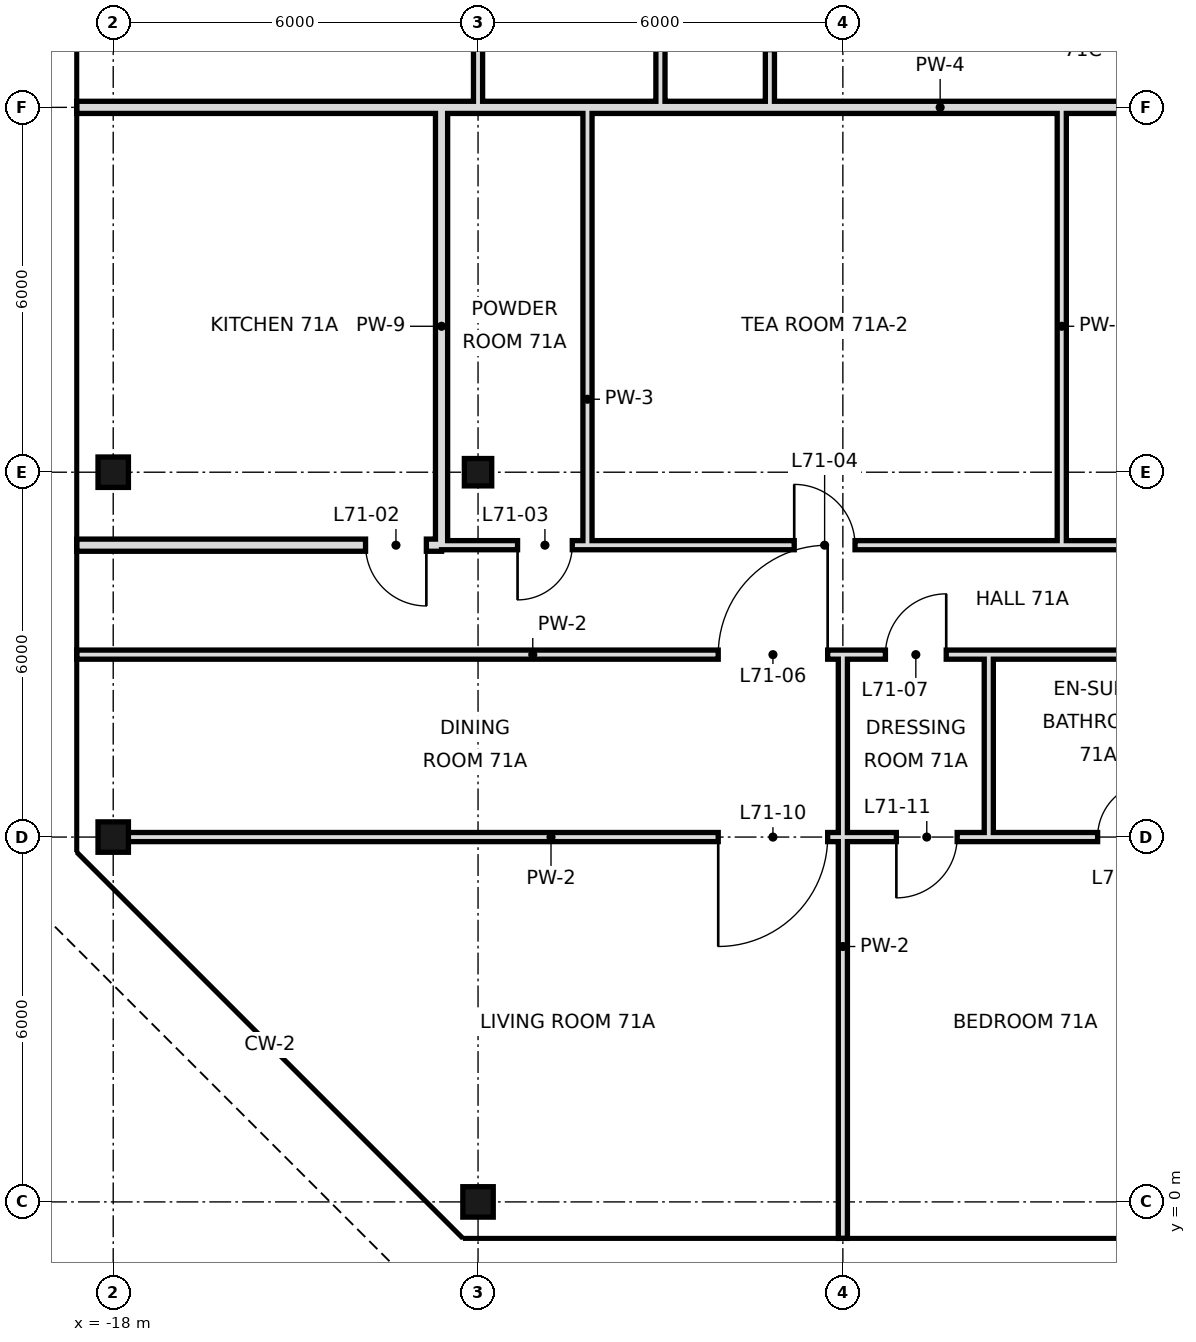
"""IFC4 building model, lengths in metres.
Left out: names, types, materials, properties, quantities, classifications, styles, units other than length and angle.
Written with IfcOpenShell. Run it as: python <this file> out.ifc"""

import sys

from ifc_helpers import new_model, si_unit, direction, frame, frame_2d, origin, origin_2d, place, context, subcontext, project, spatial, rectangle, hollow_rectangle, extrude, element, fill, save


model = new_model("IFC4")
c1 = context("Model", 3, precision=1e-05, world=origin(), true_north=direction((0.0, 1.0)))
c2 = subcontext(c1, "Body", "Model", "MODEL_VIEW")
j1 = project(units=[si_unit("LENGTHUNIT", "METRE"), si_unit("PLANEANGLEUNIT", "RADIAN")], contexts=[c1])
p1 = place(None, origin())
s1 = spatial("IfcSite", under=j1, at=p1, CompositionType="ELEMENT")
p2 = place(p1, origin())
s2 = spatial("IfcBuilding", under=s1, at=p2, CompositionType="ELEMENT")
p3 = place(p2, frame((0.0, 0.0, 301.6)))
s3 = spatial("IfcBuildingStorey", under=s2, at=p3, CompositionType="ELEMENT", Elevation=301.6)
for number, where, z_axis, x_axis in (
    (1, (-18.0, 6.0, 0.0), (0.0, 0.0, 1.0), (1.0, 0.0, 0.0)),
    (2, (-18.0, 12.0, 0.0), (0.0, 0.0, 1.0), (1.0, 0.0, 0.0)),
    (3, (-12.0, 0.0, 0.0), (0.0, 0.0, 1.0), (1.0, 0.0, 0.0)),
):
    element("IfcColumn", number, at=place(p3, frame(where, z_axis=z_axis, x_axis=x_axis)), inside=s3, PredefinedType="COLUMN", context=c2, shape_type="SweptSolid", body=[
        extrude(hollow_rectangle(XDim=0.5, YDim=0.5, WallThickness=0.025, at=origin_2d()), origin(), (0.0, 0.0, 1.0), 3.6),
    ])
p4 = place(p3, frame((-12.0, 12.0, 0.0), z_axis=(0.0, 0.0, 1.0), x_axis=(1.0, 0.0, 0.0)))
e4 = element("IfcColumn", 4, at=p4, inside=s3, PredefinedType="COLUMN", context=c2, shape_type="SweptSolid", body=[
    extrude(hollow_rectangle(XDim=0.45, YDim=0.45, WallThickness=0.022, at=origin_2d()), origin(), (0.0, 0.0, 1.0), 3.6),
])
p5 = place(p3, frame((-10.2, 10.8, 0.0), z_axis=(0.0, 0.0, 1.0), x_axis=(0.0, 1.0, 0.0)))
e5 = element("IfcWall", 5, at=p5, inside=s3, PredefinedType="PARTITIONING", context=c2, shape_type="SweptSolid", body=[
    extrude(rectangle(XDim=7.2, YDim=0.15, at=frame_2d((3.6, 0.0))), origin(), (0.0, 0.0, 1.0), 3.42),
])
p6 = place(p3, frame((-12.0, 18.0, 0.0), z_axis=(0.0, 0.0, 1.0), x_axis=(0.0, 1.0, 0.0)))
e6 = element("IfcWall", 6, at=p6, inside=s3, PredefinedType="PARTITIONING", context=c2, shape_type="SweptSolid", body=[
    extrude(rectangle(XDim=12.0, YDim=0.15, at=frame_2d((6.0, 0.0))), origin(), (0.0, 0.0, 1.0), 2.72),
])
p7 = place(p6, frame((3.16, 0.0, 0.0)))
e7 = element("IfcOpeningElement", 7, at=p7, cuts=e6, PredefinedType="OPENING", context=c2, shape_type="SweptSolid", body=[
    extrude(rectangle(XDim=1.8, YDim=2.4, at=frame_2d((0.9, 1.2))), frame((0.0, 0.085, 0.0), z_axis=(0.0, -1.0, 0.0), x_axis=(1.0, 0.0, 0.0)), (0.0, 0.0, 1.0), 0.17),
])
p8 = place(p3, frame((-12.6, 10.8, 0.0), z_axis=(0.0, 0.0, 1.0), x_axis=(0.0, 1.0, 0.0)))
e8 = element("IfcWall", 8, at=p8, inside=s3, PredefinedType="SOLIDWALL", context=c2, shape_type="SweptSolid", body=[
    extrude(rectangle(XDim=7.2, YDim=0.2, at=frame_2d((3.6, 0.0))), origin(), (0.0, 0.0, 1.0), 2.97),
])
p9 = place(p3, frame((-2.4, 10.8, 0.0), z_axis=(0.0, 0.0, 1.0), x_axis=(0.0, 1.0, 0.0)))
e9 = element("IfcWall", 9, at=p9, inside=s3, PredefinedType="PARTITIONING", context=c2, shape_type="SweptSolid", body=[
    extrude(rectangle(XDim=7.2, YDim=0.15, at=frame_2d((3.6, 0.0))), origin(), (0.0, 0.0, 1.0), 3.42),
])
p10 = place(p3, frame((-3.6, 6.0, 0.0), z_axis=(0.0, 0.0, 1.0), x_axis=(0.0, 1.0, 0.0)))
e10 = element("IfcWall", 10, at=p10, inside=s3, PredefinedType="PARTITIONING", context=c2, shape_type="SweptSolid", body=[
    extrude(rectangle(XDim=3.0, YDim=0.15, at=frame_2d((1.5, 0.0))), origin(), (0.0, 0.0, 1.0), 3.42),
])
p11 = place(p3, frame((-6.0, -0.6, 0.0), z_axis=(0.0, 0.0, 1.0), x_axis=(0.0, 1.0, 0.0)))
e11 = element("IfcWall", 11, at=p11, inside=s3, PredefinedType="PARTITIONING", context=c2, shape_type="SweptSolid", body=[
    extrude(rectangle(XDim=9.6, YDim=0.15, at=frame_2d((4.8, 0.0))), origin(), (0.0, 0.0, 1.0), 3.42),
])
p12 = place(p3, frame((-7.2, 18.0, 0.0), z_axis=(0.0, 0.0, 1.0), x_axis=(0.0, 1.0, 0.0)))
e12 = element("IfcWall", 12, at=p12, inside=s3, PredefinedType="PARTITIONING", context=c2, shape_type="SweptSolid", body=[
    extrude(rectangle(XDim=2.4, YDim=0.15, at=frame_2d((1.2, 0.0))), origin(), (0.0, 0.0, 1.0), 3.42),
])
p13 = place(p12, frame((0.95, 0.0, 0.0)))
e13 = element("IfcOpeningElement", 13, at=p13, cuts=e12, PredefinedType="OPENING", context=c2, shape_type="SweptSolid", body=[
    extrude(rectangle(XDim=0.9, YDim=2.4, at=frame_2d((0.45, 1.2))), frame((0.0, 0.085, 0.0), z_axis=(0.0, -1.0, 0.0), x_axis=(1.0, 0.0, 0.0)), (0.0, 0.0, 1.0), 0.17),
])
p14 = place(p3, frame((-9.0, 18.0, 0.0), z_axis=(0.0, 0.0, 1.0), x_axis=(0.0, 1.0, 0.0)))
e14 = element("IfcWall", 14, at=p14, inside=s3, PredefinedType="PARTITIONING", context=c2, shape_type="SweptSolid", body=[
    extrude(rectangle(XDim=18.0, YDim=0.15, at=frame_2d((9.0, 0.0))), origin(), (0.0, 0.0, 1.0), 3.42),
])
p15 = place(p14, frame((3.16, 0.0, 0.0)))
e15 = element("IfcOpeningElement", 15, at=p15, cuts=e14, PredefinedType="OPENING", context=c2, shape_type="SweptSolid", body=[
    extrude(rectangle(XDim=1.8, YDim=2.4, at=frame_2d((0.9, 1.2))), frame((0.0, 0.085, 0.0), z_axis=(0.0, -1.0, 0.0), x_axis=(1.0, 0.0, 0.0)), (0.0, 0.0, 1.0), 0.17),
])
p16 = place(p14, frame((13.6, 0.0, 0.0)))
e16 = element("IfcOpeningElement", 16, at=p16, cuts=e14, PredefinedType="OPENING", context=c2, shape_type="SweptSolid", body=[
    extrude(rectangle(XDim=1.0, YDim=2.4, at=frame_2d((0.5, 1.2))), frame((0.0, 0.085, 0.0), z_axis=(0.0, -1.0, 0.0), x_axis=(1.0, 0.0, 0.0)), (0.0, 0.0, 1.0), 0.17),
])
p17 = place(p3, frame((-18.6, 10.8, 0.0), z_axis=(0.0, 0.0, 1.0), x_axis=(1.0, 0.0, 0.0)))
e17 = element("IfcWall", 17, at=p17, inside=s3, PredefinedType="SOLIDWALL", context=c2, shape_type="SweptSolid", body=[
    extrude(rectangle(XDim=6.0, YDim=0.2, at=frame_2d((3.0, 0.0))), origin(), (0.0, 0.0, 1.0), 2.97),
])
p18 = place(p17, frame((4.75, 0.0, 0.0)))
e18 = element("IfcOpeningElement", 18, at=p18, cuts=e17, PredefinedType="OPENING", context=c2, shape_type="SweptSolid", body=[
    extrude(rectangle(XDim=1.0, YDim=2.4, at=frame_2d((0.5, 1.2))), frame((0.0, 0.11, 0.0), z_axis=(0.0, -1.0, 0.0), x_axis=(1.0, 0.0, 0.0)), (0.0, 0.0, 1.0), 0.22),
])
p19 = place(p3, frame((-10.2, 10.8, 0.0), z_axis=(0.0, 0.0, 1.0), x_axis=(1.0, 0.0, 0.0)))
e19 = element("IfcWall", 19, at=p19, inside=s3, PredefinedType="PARTITIONING", context=c2, shape_type="SweptSolid", body=[
    extrude(rectangle(XDim=22.2, YDim=0.15, at=frame_2d((11.1, 0.0))), origin(), (0.0, 0.0, 1.0), 3.42),
])
p20 = place(p19, frame((20.32, 0.0, 0.0)))
e20 = element("IfcOpeningElement", 20, at=p20, cuts=e19, PredefinedType="OPENING", context=c2, shape_type="SweptSolid", body=[
    extrude(rectangle(XDim=1.0, YDim=2.4, at=frame_2d((0.5, 1.2))), frame((0.0, 0.085, 0.0), z_axis=(0.0, -1.0, 0.0), x_axis=(1.0, 0.0, 0.0)), (0.0, 0.0, 1.0), 0.17),
])
p21 = place(p19, frame((3.4, 0.0, 0.0)))
e21 = element("IfcOpeningElement", 21, at=p21, cuts=e19, PredefinedType="OPENING", context=c2, shape_type="SweptSolid", body=[
    extrude(rectangle(XDim=1.0, YDim=2.4, at=frame_2d((0.5, 1.2))), frame((0.0, 0.085, 0.0), z_axis=(0.0, -1.0, 0.0), x_axis=(1.0, 0.0, 0.0)), (0.0, 0.0, 1.0), 0.17),
])
p22 = place(p19, frame((10.84, 0.0, 0.0)))
e22 = element("IfcOpeningElement", 22, at=p22, cuts=e19, PredefinedType="OPENING", context=c2, shape_type="SweptSolid", body=[
    extrude(rectangle(XDim=1.0, YDim=2.4, at=frame_2d((0.5, 1.2))), frame((0.0, 0.085, 0.0), z_axis=(0.0, -1.0, 0.0), x_axis=(1.0, 0.0, 0.0)), (0.0, 0.0, 1.0), 0.17),
])
p23 = place(p3, frame((-12.6, 10.8, 0.0), z_axis=(0.0, 0.0, 1.0), x_axis=(1.0, 0.0, 0.0)))
e23 = element("IfcWall", 23, at=p23, inside=s3, PredefinedType="PARTITIONING", context=c2, shape_type="SweptSolid", body=[
    extrude(rectangle(XDim=2.4, YDim=0.15, at=frame_2d((1.2, 0.0))), origin(), (0.0, 0.0, 1.0), 3.42),
])
p24 = place(p23, frame((1.25, 0.0, 0.0)))
e24 = element("IfcOpeningElement", 24, at=p24, cuts=e23, PredefinedType="OPENING", context=c2, shape_type="SweptSolid", body=[
    extrude(rectangle(XDim=0.9, YDim=2.4, at=frame_2d((0.45, 1.2))), frame((0.0, 0.085, 0.0), z_axis=(0.0, -1.0, 0.0), x_axis=(1.0, 0.0, 0.0)), (0.0, 0.0, 1.0), 0.17),
])
p25 = place(p3, frame((-18.6, 18.0, 0.0), z_axis=(0.0, 0.0, 1.0), x_axis=(1.0, 0.0, 0.0)))
e25 = element("IfcWall", 25, at=p25, inside=s3, PredefinedType="SOLIDWALL", context=c2, shape_type="SweptSolid", body=[
    extrude(rectangle(XDim=6.0, YDim=0.2, at=frame_2d((3.0, 0.0))), origin(), (0.0, 0.0, 1.0), 2.72),
])
p26 = place(p3, frame((-12.6, 18.0, 0.0), z_axis=(0.0, 0.0, 1.0), x_axis=(1.0, 0.0, 0.0)))
e26 = element("IfcWall", 26, at=p26, inside=s3, PredefinedType="SOLIDWALL", context=c2, shape_type="SweptSolid", body=[
    extrude(rectangle(XDim=15.7, YDim=0.2, at=frame_2d((7.85, 0.0))), origin(), (0.0, 0.0, 1.0), 2.72),
])
p27 = place(p3, frame((-18.0, 6.0, 0.0), z_axis=(0.0, 0.0, 1.0), x_axis=(1.0, 0.0, 0.0)))
e27 = element("IfcWall", 27, at=p27, inside=s3, PredefinedType="PARTITIONING", context=c2, shape_type="SweptSolid", body=[
    extrude(rectangle(XDim=14.4, YDim=0.15, at=frame_2d((7.2, 0.0))), origin(), (0.0, 0.0, 1.0), 2.72),
])
p28 = place(p27, frame((9.95, 0.0, 0.0)))
e28 = element("IfcOpeningElement", 28, at=p28, cuts=e27, PredefinedType="OPENING", context=c2, shape_type="SweptSolid", body=[
    extrude(rectangle(XDim=1.8, YDim=2.4, at=frame_2d((0.9, 1.2))), frame((0.0, 0.085, 0.0), z_axis=(0.0, -1.0, 0.0), x_axis=(1.0, 0.0, 0.0)), (0.0, 0.0, 1.0), 0.17),
])
p29 = place(p27, frame((12.88, 0.0, 0.0)))
e29 = element("IfcOpeningElement", 29, at=p29, cuts=e27, PredefinedType="OPENING", context=c2, shape_type="SweptSolid", body=[
    extrude(rectangle(XDim=1.0, YDim=2.4, at=frame_2d((0.5, 1.2))), frame((0.0, 0.085, 0.0), z_axis=(0.0, -1.0, 0.0), x_axis=(1.0, 0.0, 0.0)), (0.0, 0.0, 1.0), 0.17),
])
p30 = place(p3, frame((-3.6, 6.0, 0.0), z_axis=(0.0, 0.0, 1.0), x_axis=(1.0, 0.0, 0.0)))
e30 = element("IfcWall", 30, at=p30, inside=s3, PredefinedType="PARTITIONING", context=c2, shape_type="SweptSolid", body=[
    extrude(rectangle(XDim=3.6, YDim=0.15, at=frame_2d((1.8, 0.0))), origin(), (0.0, 0.0, 1.0), 2.72),
])
p31 = place(p30, frame((1.79, 0.0, 0.0)))
e31 = element("IfcOpeningElement", 31, at=p31, cuts=e30, PredefinedType="OPENING", context=c2, shape_type="SweptSolid", body=[
    extrude(rectangle(XDim=0.9, YDim=2.4, at=frame_2d((0.45, 1.2))), frame((0.0, 0.085, 0.0), z_axis=(0.0, -1.0, 0.0), x_axis=(1.0, 0.0, 0.0)), (0.0, 0.0, 1.0), 0.17),
])
p32 = place(p3, frame((-18.6, 9.0, 0.0), z_axis=(0.0, 0.0, 1.0), x_axis=(1.0, 0.0, 0.0)))
e32 = element("IfcWall", 32, at=p32, inside=s3, PredefinedType="PARTITIONING", context=c2, shape_type="SweptSolid", body=[
    extrude(rectangle(XDim=15.0, YDim=0.15, at=frame_2d((7.5, 0.0))), origin(), (0.0, 0.0, 1.0), 3.42),
])
p33 = place(p32, frame((10.55, 0.0, 0.0)))
e33 = element("IfcOpeningElement", 33, at=p33, cuts=e32, PredefinedType="OPENING", context=c2, shape_type="SweptSolid", body=[
    extrude(rectangle(XDim=1.8, YDim=2.4, at=frame_2d((0.9, 1.2))), frame((0.0, 0.085, 0.0), z_axis=(0.0, -1.0, 0.0), x_axis=(1.0, 0.0, 0.0)), (0.0, 0.0, 1.0), 0.17),
])
p34 = place(p32, frame((13.3, 0.0, 0.0)))
e34 = element("IfcOpeningElement", 34, at=p34, cuts=e32, PredefinedType="OPENING", context=c2, shape_type="SweptSolid", body=[
    extrude(rectangle(XDim=1.0, YDim=2.4, at=frame_2d((0.5, 1.2))), frame((0.0, 0.085, 0.0), z_axis=(0.0, -1.0, 0.0), x_axis=(1.0, 0.0, 0.0)), (0.0, 0.0, 1.0), 0.17),
])
p35 = place(p3, frame((-3.6, 9.0, 0.0), z_axis=(0.0, 0.0, 1.0), x_axis=(1.0, 0.0, 0.0)))
e35 = element("IfcWall", 35, at=p35, inside=s3, PredefinedType="PARTITIONING", context=c2, shape_type="SweptSolid", body=[
    extrude(rectangle(XDim=3.6, YDim=0.15, at=frame_2d((1.8, 0.0))), origin(), (0.0, 0.0, 1.0), 3.42),
])
p36 = place(p18, origin())
e36 = element("IfcDoor", 36, at=p36, inside=s3, OperationType="SINGLE_SWING_RIGHT", PredefinedType="DOOR", context=c2, shape_type="SweptSolid", body=[
    extrude(rectangle(XDim=1.0, YDim=2.4, at=frame_2d((0.5, 1.2))), frame((0.0, 0.025, 0.0), z_axis=(0.0, -1.0, 0.0), x_axis=(1.0, 0.0, 0.0)), (0.0, 0.0, 1.0), 0.05),
])
fill(e18, e36)
p37 = place(p24, frame((0.9, 0.0, 0.0), z_axis=(0.0, 0.0, 1.0), x_axis=(-1.0, 0.0, 0.0)))
e37 = element("IfcDoor", 37, at=p37, inside=s3, OperationType="SINGLE_SWING_RIGHT", PredefinedType="DOOR", context=c2, shape_type="SweptSolid", body=[
    extrude(rectangle(XDim=0.9, YDim=2.4, at=frame_2d((0.45, 1.2))), frame((0.0, 0.025, 0.0), z_axis=(0.0, -1.0, 0.0), x_axis=(1.0, 0.0, 0.0)), (0.0, 0.0, 1.0), 0.05),
])
fill(e24, e37)
p38 = place(p21, origin())
e38 = element("IfcDoor", 38, at=p38, inside=s3, OperationType="SINGLE_SWING_LEFT", PredefinedType="DOOR", context=c2, shape_type="SweptSolid", body=[
    extrude(rectangle(XDim=1.0, YDim=2.4, at=frame_2d((0.5, 1.2))), frame((0.0, 0.025, 0.0), z_axis=(0.0, -1.0, 0.0), x_axis=(1.0, 0.0, 0.0)), (0.0, 0.0, 1.0), 0.05),
])
fill(e21, e38)
p39 = place(p33, frame((1.8, 0.0, 0.0), z_axis=(0.0, 0.0, 1.0), x_axis=(-1.0, 0.0, 0.0)))
e39 = element("IfcDoor", 39, at=p39, inside=s3, OperationType="SINGLE_SWING_LEFT", PredefinedType="DOOR", context=c2, shape_type="SweptSolid", body=[
    extrude(rectangle(XDim=1.8, YDim=2.4, at=frame_2d((0.9, 1.2))), frame((0.0, 0.025, 0.0), z_axis=(0.0, -1.0, 0.0), x_axis=(1.0, 0.0, 0.0)), (0.0, 0.0, 1.0), 0.05),
])
fill(e33, e39)
p40 = place(p34, frame((1.0, 0.0, 0.0), z_axis=(0.0, 0.0, 1.0), x_axis=(-1.0, 0.0, 0.0)))
e40 = element("IfcDoor", 40, at=p40, inside=s3, OperationType="SINGLE_SWING_LEFT", PredefinedType="DOOR", context=c2, shape_type="SweptSolid", body=[
    extrude(rectangle(XDim=1.0, YDim=2.4, at=frame_2d((0.5, 1.2))), frame((0.0, 0.025, 0.0), z_axis=(0.0, -1.0, 0.0), x_axis=(1.0, 0.0, 0.0)), (0.0, 0.0, 1.0), 0.05),
])
fill(e34, e40)
p41 = place(p28, frame((1.8, 0.0, 0.0), z_axis=(0.0, 0.0, 1.0), x_axis=(-1.0, 0.0, 0.0)))
e41 = element("IfcDoor", 41, at=p41, inside=s3, OperationType="SINGLE_SWING_RIGHT", PredefinedType="DOOR", context=c2, shape_type="SweptSolid", body=[
    extrude(rectangle(XDim=1.8, YDim=2.4, at=frame_2d((0.9, 1.2))), frame((0.0, 0.025, 0.0), z_axis=(0.0, -1.0, 0.0), x_axis=(1.0, 0.0, 0.0)), (0.0, 0.0, 1.0), 0.05),
])
fill(e28, e41)
p42 = place(p29, frame((1.0, 0.0, 0.0), z_axis=(0.0, 0.0, 1.0), x_axis=(-1.0, 0.0, 0.0)))
e42 = element("IfcDoor", 42, at=p42, inside=s3, OperationType="SINGLE_SWING_RIGHT", PredefinedType="DOOR", context=c2, shape_type="SweptSolid", body=[
    extrude(rectangle(XDim=1.0, YDim=2.4, at=frame_2d((0.5, 1.2))), frame((0.0, 0.025, 0.0), z_axis=(0.0, -1.0, 0.0), x_axis=(1.0, 0.0, 0.0)), (0.0, 0.0, 1.0), 0.05),
])
fill(e29, e42)
p43 = place(p31, frame((0.9, 0.0, 0.0), z_axis=(0.0, 0.0, 1.0), x_axis=(-1.0, 0.0, 0.0)))
e43 = element("IfcDoor", 43, at=p43, inside=s3, OperationType="SINGLE_SWING_LEFT", PredefinedType="DOOR", context=c2, shape_type="SweptSolid", body=[
    extrude(rectangle(XDim=0.9, YDim=2.4, at=frame_2d((0.45, 1.2))), frame((0.0, 0.025, 0.0), z_axis=(0.0, -1.0, 0.0), x_axis=(1.0, 0.0, 0.0)), (0.0, 0.0, 1.0), 0.05),
])
fill(e31, e43)
save(model, sys.argv[1])
